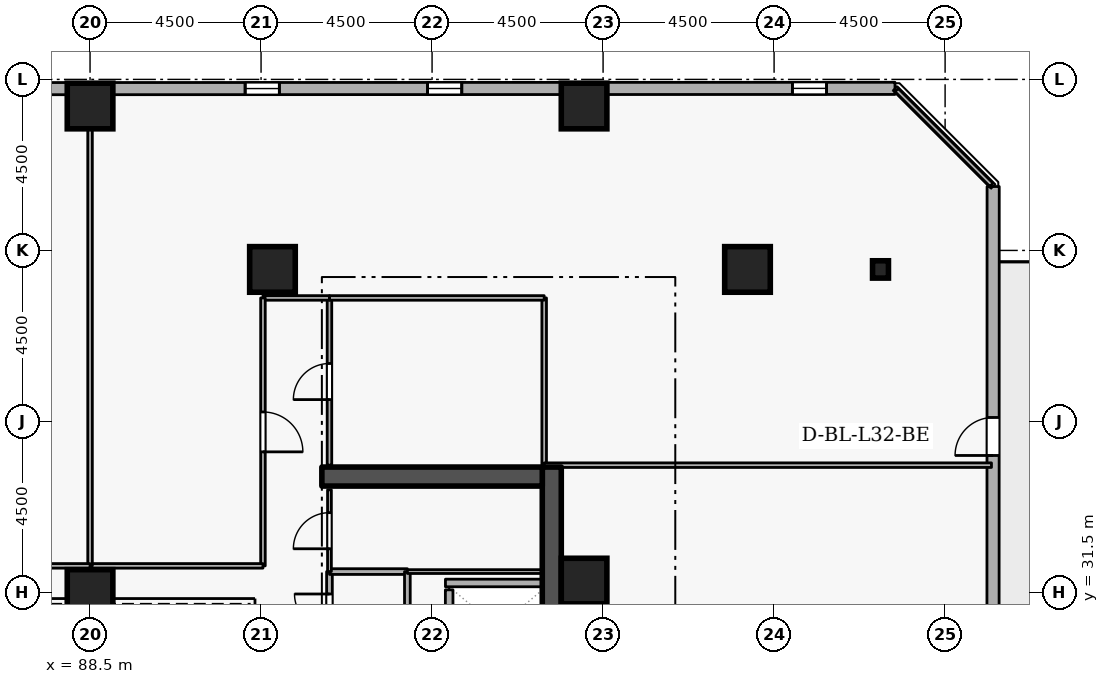
"""IFC4 building model, lengths in metres.
Left out: names, types, materials, properties, quantities, classifications, styles, units other than length and angle.
Written with IfcOpenShell. Run it as: python <this file> out.ifc"""

import sys

from ifc_helpers import new_model, si_unit, direction, frame, frame_2d, origin, origin_2d, place, context, subcontext, project, spatial, rectangle, i_section, extrude, element, fill, save


model = new_model("IFC4")
c1 = context("Model", 3, precision=1e-05, world=origin(), true_north=direction((0.0, 1.0)))
c2 = subcontext(c1, "Body", "Model", "MODEL_VIEW")
j1 = project(units=[si_unit("LENGTHUNIT", "METRE"), si_unit("PLANEANGLEUNIT", "RADIAN")], contexts=[c1])
p1 = place(None, origin())
s1 = spatial("IfcSite", under=j1, at=p1, CompositionType="ELEMENT")
p2 = place(p1, origin())
s2 = spatial("IfcBuilding", under=s1, at=p2, CompositionType="ELEMENT")
p3 = place(p2, frame((0.0, 0.0, 123.3)))
s3 = spatial("IfcBuildingStorey", under=s2, at=p3, CompositionType="ELEMENT", Elevation=123.3)
p4 = place(p3, frame((100.65, 19.2, 0.0), z_axis=(0.0, 0.0, 1.0), x_axis=(0.0, 1.0, 0.0)))
e1 = element("IfcWall", 1, at=p4, inside=s3, PredefinedType="SHEAR", context=c2, shape_type="SweptSolid", body=[
    extrude(rectangle(XDim=15.6, YDim=0.5, at=frame_2d((7.8, 0.0))), origin(), (0.0, 0.0, 1.0), 3.6),
])
p5 = place(p3, frame((94.6, 34.55, 0.0), z_axis=(0.0, 0.0, 1.0), x_axis=(1.0, 0.0, 0.0)))
e2 = element("IfcWall", 2, at=p5, inside=s3, PredefinedType="SHEAR", context=c2, shape_type="SweptSolid", body=[
    extrude(rectangle(XDim=5.8, YDim=0.5, at=frame_2d((2.9, 0.0))), origin(), (0.0, 0.0, 1.0), 3.6),
])
for number, where, z_axis, x_axis in (
    (3, (105.8, 40.0, 0.0), (0.0, 0.0, 1.0), (1.0, 0.0, 0.0)),
    (4, (101.5, 44.3, 0.0), (0.0, 0.0, 1.0), (1.0, 0.0, 0.0)),
    (5, (88.5, 44.3, 0.0), (0.0, 0.0, 1.0), (1.0, 0.0, 0.0)),
    (6, (93.3, 40.0, 0.0), (0.0, 0.0, 1.0), (1.0, 0.0, 0.0)),
    (7, (101.5, 31.8, 0.0), (0.0, 0.0, 1.0), (1.0, 0.0, 0.0)),
    (8, (88.5, 31.5, 0.0), (0.0, 0.0, 1.0), (1.0, 0.0, 0.0)),
):
    element("IfcColumn", number, at=place(p3, frame(where, z_axis=z_axis, x_axis=x_axis)), inside=s3, PredefinedType="COLUMN", context=c2, shape_type="SweptSolid", body=[
        extrude(rectangle(XDim=1.2, YDim=1.2, at=origin_2d()), origin(), (0.0, 0.0, 1.0), 3.6),
    ])
p6 = place(p3, frame((109.3, 40.0, 0.0), z_axis=(0.0, 0.0, 1.0), x_axis=(1.0, 0.0, 0.0)))
e9 = element("IfcColumn", 9, at=p6, inside=s3, PredefinedType="COLUMN", context=c2, shape_type="SweptSolid", body=[
    extrude(i_section(OverallWidth=0.418, OverallDepth=0.456, WebThickness=0.042, FlangeThickness=0.067, FilletRadius=0.015, at=origin_2d()), origin(), (0.0, 0.0, 1.0), 3.6),
])
p7 = place(p3, frame((112.254, 9.128, 0.0), z_axis=(0.0, 0.0, 1.0), x_axis=(0.000332378036, 0.999999944762, 0.0)))
e10 = element("IfcWall", 10, at=p7, inside=s3, PredefinedType="STANDARD", context=c2, shape_type="SweptSolid", body=[
    extrude(rectangle(XDim=33.054, YDim=0.32, at=frame_2d((16.527, 0.0))), origin(), (0.0, 0.0, 1.0), 2.7),
])
p8 = place(p7, frame((25.977, 0.0, 0.0)))
e11 = element("IfcOpeningElement", 11, at=p8, cuts=e10, PredefinedType="OPENING", context=c2, shape_type="SweptSolid", body=[
    extrude(rectangle(XDim=1.0, YDim=2.08, at=frame_2d((0.5, 1.04))), frame((0.0, 0.17, 0.0), z_axis=(0.0, -1.0, 0.0), x_axis=(1.0, 0.0, 0.0)), (0.0, 0.0, 1.0), 0.34),
])
p9 = place(p7, frame((1.8, 0.0, 0.72)))
e12 = element("IfcOpeningElement", 12, at=p9, cuts=e10, PredefinedType="OPENING", context=c2, shape_type="SweptSolid", body=[
    extrude(rectangle(XDim=0.9, YDim=1.75, at=frame_2d((0.45, 0.875))), frame((0.0, 0.17, 0.0), z_axis=(0.0, -1.0, 0.0), x_axis=(1.0, 0.0, 0.0)), (0.0, 0.0, 1.0), 0.34),
])
p10 = place(p7, frame((11.4, 0.0, 0.72)))
e13 = element("IfcOpeningElement", 13, at=p10, cuts=e10, PredefinedType="OPENING", context=c2, shape_type="SweptSolid", body=[
    extrude(rectangle(XDim=0.9, YDim=1.75, at=frame_2d((0.45, 0.875))), frame((0.0, 0.17, 0.0), z_axis=(0.0, -1.0, 0.0), x_axis=(1.0, 0.0, 0.0)), (0.0, 0.0, 1.0), 0.34),
])
p11 = place(p7, frame((16.2, 0.0, 0.72)))
e14 = element("IfcOpeningElement", 14, at=p11, cuts=e10, PredefinedType="OPENING", context=c2, shape_type="SweptSolid", body=[
    extrude(rectangle(XDim=0.9, YDim=1.75, at=frame_2d((0.45, 0.875))), frame((0.0, 0.17, 0.0), z_axis=(0.0, -1.0, 0.0), x_axis=(1.0, 0.0, 0.0)), (0.0, 0.0, 1.0), 0.34),
])
p12 = place(p7, frame((21.0, 0.0, 0.72)))
e15 = element("IfcOpeningElement", 15, at=p12, cuts=e10, PredefinedType="OPENING", context=c2, shape_type="SweptSolid", body=[
    extrude(rectangle(XDim=0.9, YDim=1.75, at=frame_2d((0.45, 0.875))), frame((0.0, 0.17, 0.0), z_axis=(0.0, -1.0, 0.0), x_axis=(1.0, 0.0, 0.0)), (0.0, 0.0, 1.0), 0.34),
])
p13 = place(p3, frame((109.681, 44.765, 0.0), z_axis=(0.0, 0.0, 1.0), x_axis=(-0.999999944762, -0.000332378036, 0.0)))
e16 = element("IfcWall", 16, at=p13, inside=s3, PredefinedType="STANDARD", context=c2, shape_type="SweptSolid", body=[
    extrude(rectangle(XDim=33.054, YDim=0.32, at=frame_2d((16.527, 0.0))), origin(), (0.0, 0.0, 1.0), 2.7),
])
p14 = place(p13, frame((1.8, 0.0, 0.72)))
e17 = element("IfcOpeningElement", 17, at=p14, cuts=e16, PredefinedType="OPENING", context=c2, shape_type="SweptSolid", body=[
    extrude(rectangle(XDim=0.9, YDim=1.75, at=frame_2d((0.45, 0.875))), frame((0.0, 0.17, 0.0), z_axis=(0.0, -1.0, 0.0), x_axis=(1.0, 0.0, 0.0)), (0.0, 0.0, 1.0), 0.34),
])
p15 = place(p13, frame((11.4, 0.0, 0.72)))
e18 = element("IfcOpeningElement", 18, at=p15, cuts=e16, PredefinedType="OPENING", context=c2, shape_type="SweptSolid", body=[
    extrude(rectangle(XDim=0.9, YDim=1.75, at=frame_2d((0.45, 0.875))), frame((0.0, 0.17, 0.0), z_axis=(0.0, -1.0, 0.0), x_axis=(1.0, 0.0, 0.0)), (0.0, 0.0, 1.0), 0.34),
])
p16 = place(p13, frame((16.2, 0.0, 0.72)))
e19 = element("IfcOpeningElement", 19, at=p16, cuts=e16, PredefinedType="OPENING", context=c2, shape_type="SweptSolid", body=[
    extrude(rectangle(XDim=0.9, YDim=1.75, at=frame_2d((0.45, 0.875))), frame((0.0, 0.17, 0.0), z_axis=(0.0, -1.0, 0.0), x_axis=(1.0, 0.0, 0.0)), (0.0, 0.0, 1.0), 0.34),
])
p17 = place(p13, frame((25.8, 0.0, 0.72)))
e20 = element("IfcOpeningElement", 20, at=p17, cuts=e16, PredefinedType="OPENING", context=c2, shape_type="SweptSolid", body=[
    extrude(rectangle(XDim=0.9, YDim=1.75, at=frame_2d((0.45, 0.875))), frame((0.0, 0.17, 0.0), z_axis=(0.0, -1.0, 0.0), x_axis=(1.0, 0.0, 0.0)), (0.0, 0.0, 1.0), 0.34),
])
p18 = place(p3, frame((97.95, 31.57, 0.0), z_axis=(0.0, 0.0, 1.0), x_axis=(0.0, -1.0, 0.0)))
e21 = element("IfcWall", 21, at=p18, inside=s3, PredefinedType="STANDARD", context=c2, shape_type="SweptSolid", body=[
    extrude(rectangle(XDim=1.99, YDim=0.2, at=frame_2d((0.995, 0.0))), origin(), (0.0, 0.0, 1.0), 3.34),
])
p19 = place(p3, frame((97.852, 31.75, 0.0), z_axis=(0.0, 0.0, 1.0), x_axis=(1.0, 0.0, 0.0)))
e22 = element("IfcWall", 22, at=p19, inside=s3, PredefinedType="STANDARD", context=c2, shape_type="SweptSolid", body=[
    extrude(rectangle(XDim=2.536, YDim=0.2, at=frame_2d((1.268, 0.0))), origin(), (0.0, 0.0, 1.0), 3.34),
])
p20 = place(p3, frame((94.8, 29.95, 0.0), z_axis=(0.0, 0.0, 1.0), x_axis=(0.0, 1.0, 0.0)))
e23 = element("IfcWall", 23, at=p20, inside=s3, PredefinedType="PARTITIONING", context=c2, shape_type="SweptSolid", body=[
    extrude(rectangle(XDim=2.1, YDim=0.15, at=frame_2d((1.05, 0.0))), origin(), (0.0, 0.0, 1.0), 3.34),
])
p21 = place(p20, frame((0.59, 0.0, 0.0)))
e24 = element("IfcOpeningElement", 24, at=p21, cuts=e23, PredefinedType="OPENING", context=c2, shape_type="SweptSolid", body=[
    extrude(rectangle(XDim=0.92, YDim=2.08, at=frame_2d((0.46, 1.04))), frame((0.0, 0.085, 0.0), z_axis=(0.0, -1.0, 0.0), x_axis=(1.0, 0.0, 0.0)), (0.0, 0.0, 1.0), 0.17),
])
p22 = place(p3, frame((94.8, 32.05, 0.0), z_axis=(0.0, 0.0, 1.0), x_axis=(1.0, 0.0, 0.0)))
e25 = element("IfcWall", 25, at=p22, inside=s3, PredefinedType="PARTITIONING", context=c2, shape_type="SweptSolid", body=[
    extrude(rectangle(XDim=2.05, YDim=0.15, at=frame_2d((1.025, 0.0))), origin(), (0.0, 0.0, 1.0), 3.34),
])
p23 = place(p3, frame((96.85, 32.05, 0.0), z_axis=(0.0, 0.0, 1.0), x_axis=(0.0, -1.0, 0.0)))
e26 = element("IfcWall", 26, at=p23, inside=s3, PredefinedType="PARTITIONING", context=c2, shape_type="SweptSolid", body=[
    extrude(rectangle(XDim=2.1, YDim=0.15, at=frame_2d((1.05, 0.0))), origin(), (0.0, 0.0, 1.0), 3.34),
])
p24 = place(p3, frame((94.8, 32.05, 0.0), z_axis=(0.0, 0.0, 1.0), x_axis=(0.0, 1.0, 0.0)))
e27 = element("IfcWall", 27, at=p24, inside=s3, PredefinedType="PARTITIONING", context=c2, shape_type="SweptSolid", body=[
    extrude(rectangle(XDim=2.15, YDim=0.1, at=frame_2d((1.075, 0.0))), origin(), (0.0, 0.0, 1.0), 3.34),
])
p25 = place(p24, frame((0.6, 0.0, 0.0)))
e28 = element("IfcOpeningElement", 28, at=p25, cuts=e27, PredefinedType="OPENING", context=c2, shape_type="SweptSolid", body=[
    extrude(rectangle(XDim=0.95, YDim=2.1, at=frame_2d((0.475, 1.05))), frame((0.0, 0.06, 0.0), z_axis=(0.0, -1.0, 0.0), x_axis=(1.0, 0.0, 0.0)), (0.0, 0.0, 1.0), 0.12),
])
p26 = place(p3, frame((100.4, 32.05, 0.0), z_axis=(0.0, 0.0, 1.0), x_axis=(-1.0, 0.0, 0.0)))
e29 = element("IfcWall", 29, at=p26, inside=s3, PredefinedType="PARTITIONING", context=c2, shape_type="SweptSolid", body=[
    extrude(rectangle(XDim=3.55, YDim=0.1, at=frame_2d((1.775, 0.0))), origin(), (0.0, 0.0, 1.0), 3.34),
])
p27 = place(p3, frame((100.45, 39.25, 0.0), z_axis=(0.0, 0.0, 1.0), x_axis=(0.0, -1.0, 0.0)))
e30 = element("IfcWall", 30, at=p27, inside=s3, PredefinedType="PARTITIONING", context=c2, shape_type="SweptSolid", body=[
    extrude(rectangle(XDim=4.4, YDim=0.12, at=frame_2d((2.2, 0.0))), origin(), (0.0, 0.0, 1.0), 3.34),
])
p28 = place(p3, frame((94.8, 34.85, 0.0), z_axis=(0.0, 0.0, 1.0), x_axis=(0.0, 1.0, 0.0)))
e31 = element("IfcWall", 31, at=p28, inside=s3, PredefinedType="PARTITIONING", context=c2, shape_type="SweptSolid", body=[
    extrude(rectangle(XDim=4.4, YDim=0.12, at=frame_2d((2.2, 0.0))), origin(), (0.0, 0.0, 1.0), 3.34),
])
p29 = place(p28, frame((1.725, 0.0, 0.0)))
e32 = element("IfcOpeningElement", 32, at=p29, cuts=e31, PredefinedType="OPENING", context=c2, shape_type="SweptSolid", body=[
    extrude(rectangle(XDim=0.95, YDim=2.1, at=frame_2d((0.475, 1.05))), frame((0.0, 0.07, 0.0), z_axis=(0.0, -1.0, 0.0), x_axis=(1.0, 0.0, 0.0)), (0.0, 0.0, 1.0), 0.14),
])
p30 = place(p3, frame((94.8, 39.25, 0.0), z_axis=(0.0, 0.0, 1.0), x_axis=(1.0, 0.0, 0.0)))
e33 = element("IfcWall", 33, at=p30, inside=s3, PredefinedType="PARTITIONING", context=c2, shape_type="SweptSolid", body=[
    extrude(rectangle(XDim=5.65, YDim=0.12, at=frame_2d((2.825, 0.0))), origin(), (0.0, 0.0, 1.0), 3.34),
])
p31 = place(p3, frame((94.8, 39.25, 0.0), z_axis=(0.0, 0.0, 1.0), x_axis=(-1.0, 0.0, 0.0)))
e34 = element("IfcWall", 34, at=p31, inside=s3, PredefinedType="PARTITIONING", context=c2, shape_type="SweptSolid", body=[
    extrude(rectangle(XDim=1.75, YDim=0.12, at=frame_2d((0.875, 0.0))), origin(), (0.0, 0.0, 1.0), 3.34),
])
p32 = place(p3, frame((93.05, 39.25, 0.0), z_axis=(0.0, 0.0, 1.0), x_axis=(0.0, -1.0, 0.0)))
e35 = element("IfcWall", 35, at=p32, inside=s3, PredefinedType="PARTITIONING", context=c2, shape_type="SweptSolid", body=[
    extrude(rectangle(XDim=7.05, YDim=0.12, at=frame_2d((3.525, 0.0))), origin(), (0.0, 0.0, 1.0), 3.34),
])
p33 = place(p32, frame((3.0, 0.0, 0.0)))
e36 = element("IfcOpeningElement", 36, at=p33, cuts=e35, PredefinedType="OPENING", context=c2, shape_type="SweptSolid", body=[
    extrude(rectangle(XDim=1.05, YDim=2.1, at=frame_2d((0.525, 1.05))), frame((0.0, 0.07, 0.0), z_axis=(0.0, -1.0, 0.0), x_axis=(1.0, 0.0, 0.0)), (0.0, 0.0, 1.0), 0.14),
])
p34 = place(p3, frame((93.05, 32.2, 0.0), z_axis=(0.0, 0.0, 1.0), x_axis=(-1.0, 0.0, 0.0)))
e37 = element("IfcWall", 37, at=p34, inside=s3, PredefinedType="PARTITIONING", context=c2, shape_type="SweptSolid", body=[
    extrude(rectangle(XDim=4.55, YDim=0.12, at=frame_2d((2.275, 0.0))), origin(), (0.0, 0.0, 1.0), 3.34),
])
p35 = place(p3, frame((88.5, 32.2, 0.0), z_axis=(0.0, 0.0, 1.0), x_axis=(0.0, 1.0, 0.0)))
e38 = element("IfcWall", 38, at=p35, inside=s3, PredefinedType="PARTITIONING", context=c2, shape_type="SweptSolid", body=[
    extrude(rectangle(XDim=12.52, YDim=0.12, at=frame_2d((6.26, 0.0))), origin(), (0.0, 0.0, 1.0), 2.932),
])
p36 = place(p3, frame((109.725, 44.72, 0.0), z_axis=(0.0, 0.0, 1.0), x_axis=(0.707106781187, -0.707106781187, 0.0)))
e39 = element("IfcWall", 39, at=p36, inside=s3, PredefinedType="PARTITIONING", context=c2, shape_type="SweptSolid", body=[
    extrude(rectangle(XDim=3.528, YDim=0.12, at=frame_2d((1.764, 0.0))), origin(), (0.0, 0.0, 1.0), 3.34),
])
p37 = place(p3, frame((112.22, 34.85, 0.0), z_axis=(0.0, 0.0, 1.0), x_axis=(-1.0, 0.0, 0.0)))
e40 = element("IfcWall", 40, at=p37, inside=s3, PredefinedType="PARTITIONING", context=c2, shape_type="SweptSolid", body=[
    extrude(rectangle(XDim=11.77, YDim=0.12, at=frame_2d((5.885, 0.0))), origin(), (0.0, 0.0, 1.0), 2.545),
])
p38 = place(p3, frame((88.5, 32.2, 0.0), z_axis=(0.0, 0.0, 1.0), x_axis=(-1.0, 0.0, 0.0)))
e41 = element("IfcWall", 41, at=p38, inside=s3, PredefinedType="PARTITIONING", context=c2, shape_type="SweptSolid", body=[
    extrude(rectangle(XDim=4.55, YDim=0.12, at=frame_2d((2.275, 0.0))), origin(), (0.0, 0.0, 1.0), 3.34),
])
p39 = place(p8, origin())
e42 = element("IfcDoor", 42, at=p39, inside=s3, OperationType="SINGLE_SWING_LEFT", PredefinedType="DOOR", context=c2, shape_type="SweptSolid", body=[
    extrude(rectangle(XDim=1.0, YDim=2.08, at=frame_2d((0.5, 1.04))), frame((0.0, 0.025, 0.0), z_axis=(0.0, -1.0, 0.0), x_axis=(1.0, 0.0, 0.0)), (0.0, 0.0, 1.0), 0.05),
])
fill(e11, e42)
p40 = place(p14, origin())
e43 = element("IfcWindow", 43, at=p40, inside=s3, PartitioningType="SINGLE_PANEL", PredefinedType="WINDOW", context=c2, shape_type="SweptSolid", body=[
    extrude(rectangle(XDim=0.9, YDim=1.75, at=frame_2d((0.45, 0.875))), frame((0.0, 0.03, 0.0), z_axis=(0.0, -1.0, 0.0), x_axis=(1.0, 0.0, 0.0)), (0.0, 0.0, 1.0), 0.06),
])
fill(e17, e43)
p41 = place(p15, origin())
e44 = element("IfcWindow", 44, at=p41, inside=s3, PartitioningType="SINGLE_PANEL", PredefinedType="WINDOW", context=c2, shape_type="SweptSolid", body=[
    extrude(rectangle(XDim=0.9, YDim=1.75, at=frame_2d((0.45, 0.875))), frame((0.0, 0.03, 0.0), z_axis=(0.0, -1.0, 0.0), x_axis=(1.0, 0.0, 0.0)), (0.0, 0.0, 1.0), 0.06),
])
fill(e18, e44)
p42 = place(p16, origin())
e45 = element("IfcWindow", 45, at=p42, inside=s3, PartitioningType="SINGLE_PANEL", PredefinedType="WINDOW", context=c2, shape_type="SweptSolid", body=[
    extrude(rectangle(XDim=0.9, YDim=1.75, at=frame_2d((0.45, 0.875))), frame((0.0, 0.03, 0.0), z_axis=(0.0, -1.0, 0.0), x_axis=(1.0, 0.0, 0.0)), (0.0, 0.0, 1.0), 0.06),
])
fill(e19, e45)
p43 = place(p21, origin())
e46 = element("IfcDoor", 46, at=p43, inside=s3, OperationType="SINGLE_SWING_RIGHT", PredefinedType="DOOR", context=c2, shape_type="SweptSolid", body=[
    extrude(rectangle(XDim=0.92, YDim=2.08, at=frame_2d((0.46, 1.04))), frame((0.0, 0.025, 0.0), z_axis=(0.0, -1.0, 0.0), x_axis=(1.0, 0.0, 0.0)), (0.0, 0.0, 1.0), 0.05),
])
fill(e24, e46)
p44 = place(p25, origin())
e47 = element("IfcDoor", 47, at=p44, inside=s3, OperationType="SINGLE_SWING_LEFT", PredefinedType="DOOR", context=c2, shape_type="SweptSolid", body=[
    extrude(rectangle(XDim=0.95, YDim=2.1, at=frame_2d((0.475, 1.05))), frame((0.0, 0.025, 0.0), z_axis=(0.0, -1.0, 0.0), x_axis=(1.0, 0.0, 0.0)), (0.0, 0.0, 1.0), 0.05),
])
fill(e28, e47)
p45 = place(p29, origin())
e48 = element("IfcDoor", 48, at=p45, inside=s3, OperationType="SINGLE_SWING_LEFT", PredefinedType="DOOR", context=c2, shape_type="SweptSolid", body=[
    extrude(rectangle(XDim=0.95, YDim=2.1, at=frame_2d((0.475, 1.05))), frame((0.0, 0.025, 0.0), z_axis=(0.0, -1.0, 0.0), x_axis=(1.0, 0.0, 0.0)), (0.0, 0.0, 1.0), 0.05),
])
fill(e32, e48)
p46 = place(p33, origin())
e49 = element("IfcDoor", 49, at=p46, inside=s3, OperationType="SINGLE_SWING_RIGHT", PredefinedType="DOOR", context=c2, shape_type="SweptSolid", body=[
    extrude(rectangle(XDim=1.05, YDim=2.1, at=frame_2d((0.525, 1.05))), frame((0.0, 0.025, 0.0), z_axis=(0.0, -1.0, 0.0), x_axis=(1.0, 0.0, 0.0)), (0.0, 0.0, 1.0), 0.05),
])
fill(e36, e49)
save(model, sys.argv[1])
